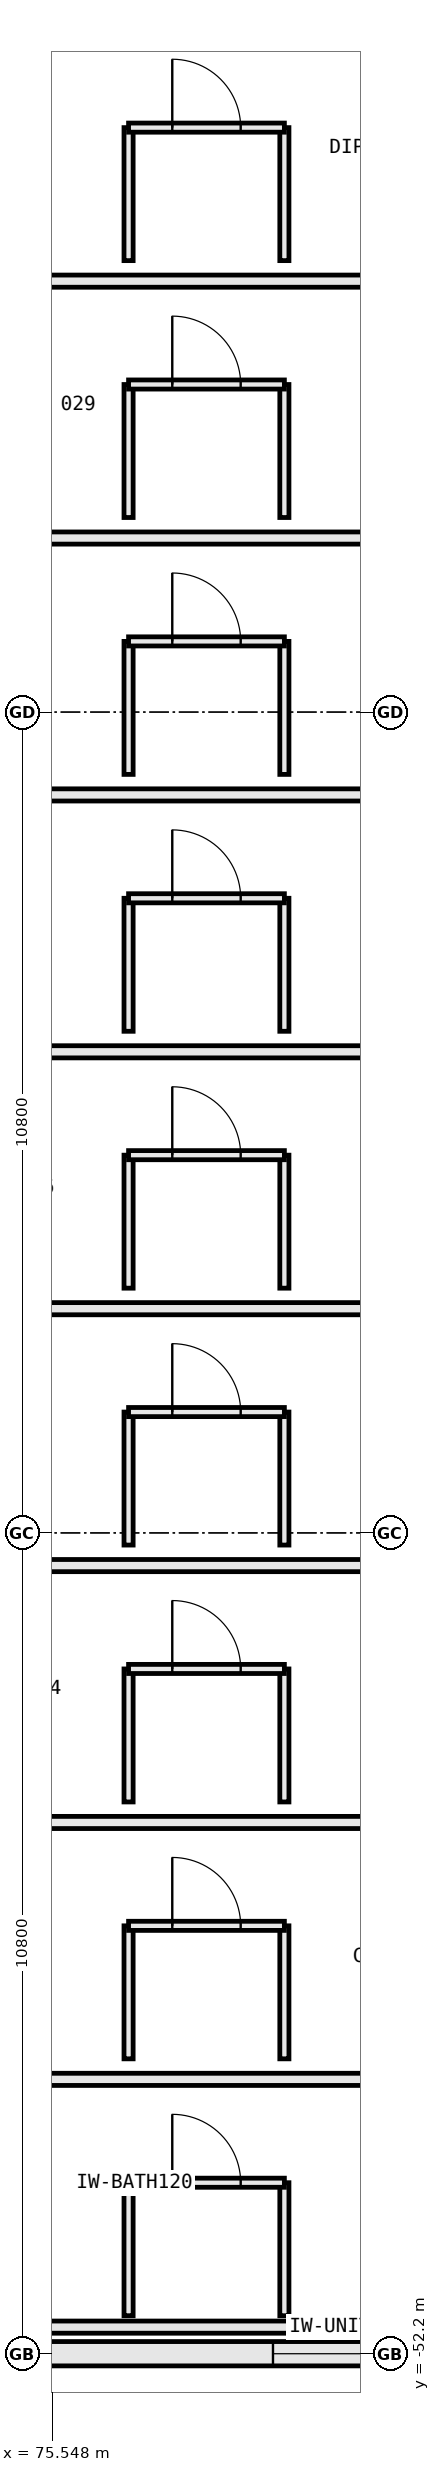
"""IFC4 building model, lengths in metres.
Left out: names, types, materials, properties, quantities, classifications, styles, units other than length and angle.
Written with IfcOpenShell. Run it as: python <this file> out.ifc"""

import sys

from ifc_helpers import new_model, si_unit, direction, frame, frame_2d, origin, place, context, subcontext, project, spatial, rectangle, extrude, element, fill, save


model = new_model("IFC4")
c1 = context("Model", 3, precision=1e-05, world=origin(), true_north=direction((0.0, 1.0)))
c2 = subcontext(c1, "Body", "Model", "MODEL_VIEW")
j1 = project(units=[si_unit("LENGTHUNIT", "METRE"), si_unit("PLANEANGLEUNIT", "RADIAN")], contexts=[c1])
p1 = place(None, origin())
s1 = spatial("IfcSite", under=j1, at=p1, CompositionType="ELEMENT")
p2 = place(p1, origin())
s2 = spatial("IfcBuilding", under=s1, at=p2, CompositionType="ELEMENT")
p3 = place(p2, frame((0.0, 0.0, 10.8)))
s3 = spatial("IfcBuildingStorey", under=s2, at=p3, CompositionType="ELEMENT", Elevation=10.8)
p4 = place(p3, frame((75.123, -52.2, 0.0), z_axis=(0.0, 0.0, 1.0), x_axis=(1.0, 0.0, 0.0)))
e1 = element("IfcWall", 1, at=p4, inside=s3, PredefinedType="STANDARD", context=c2, shape_type="SweptSolid", body=[
    extrude(rectangle(XDim=8.604, YDim=0.32, at=frame_2d((4.302, 0.0))), origin(), (0.0, 0.0, 1.0), 4.183),
])
p5 = place(p4, frame((3.327, 0.0, 0.85)))
e2 = element("IfcOpeningElement", 2, at=p5, cuts=e1, PredefinedType="OPENING", context=c2, shape_type="SweptSolid", body=[
    extrude(rectangle(XDim=1.95, YDim=1.9, at=frame_2d((0.975, 0.95))), frame((0.0, 0.172, 0.0), z_axis=(0.0, -1.0, 0.0), x_axis=(1.0, 0.0, 0.0)), (0.0, 0.0, 1.0), 0.344),
])
p6 = place(p3, frame((71.05, -51.85, 0.0), z_axis=(0.0, 0.0, 1.0), x_axis=(1.0, 0.0, 0.0)))
e3 = element("IfcWall", 3, at=p6, inside=s3, PredefinedType="PARTITIONING", context=c2, shape_type="SweptSolid", body=[
    extrude(rectangle(XDim=12.79, YDim=0.16, at=frame_2d((6.395, 0.0))), origin(), (0.0, 0.0, 1.0), 4.183),
])
p7 = place(p3, frame((71.05, -48.59, 0.0), z_axis=(0.0, 0.0, 1.0), x_axis=(1.0, 0.0, 0.0)))
e4 = element("IfcWall", 4, at=p7, inside=s3, PredefinedType="PARTITIONING", context=c2, shape_type="SweptSolid", body=[
    extrude(rectangle(XDim=12.79, YDim=0.16, at=frame_2d((6.395, 0.0))), origin(), (0.0, 0.0, 1.0), 4.8),
])
for number, where, z_axis, x_axis in (
    (5, (76.55, -51.7, 0.0), (0.0, 0.0, 1.0), (0.0, 1.0, 0.0)),
    (6, (78.6, -51.7, 0.0), (0.0, 0.0, 1.0), (0.0, 1.0, 0.0)),
):
    element("IfcWall", number, at=place(p3, frame(where, z_axis=z_axis, x_axis=x_axis)), inside=s3, PredefinedType="PARTITIONING", context=c2, shape_type="SweptSolid", body=[
        extrude(rectangle(XDim=1.75, YDim=0.12, at=frame_2d((0.875, 0.0))), origin(), (0.0, 0.0, 1.0), 4.8),
    ])
p8 = place(p3, frame((76.55, -49.95, 0.0), z_axis=(0.0, 0.0, 1.0), x_axis=(1.0, 0.0, 0.0)))
e7 = element("IfcWall", 7, at=p8, inside=s3, PredefinedType="PARTITIONING", context=c2, shape_type="SweptSolid", body=[
    extrude(rectangle(XDim=2.05, YDim=0.12, at=frame_2d((1.025, 0.0))), origin(), (0.0, 0.0, 1.0), 4.8),
])
p9 = place(p8, frame((0.575, 0.0, 0.0)))
e8 = element("IfcOpeningElement", 8, at=p9, cuts=e7, PredefinedType="OPENING", context=c2, shape_type="SweptSolid", body=[
    extrude(rectangle(XDim=0.9, YDim=2.15, at=frame_2d((0.45, 1.075))), frame((0.0, 0.072, 0.0), z_axis=(0.0, -1.0, 0.0), x_axis=(1.0, 0.0, 0.0)), (0.0, 0.0, 1.0), 0.144),
])
p10 = place(p3, frame((71.05, -45.21, 0.0), z_axis=(0.0, 0.0, 1.0), x_axis=(1.0, 0.0, 0.0)))
e9 = element("IfcWall", 9, at=p10, inside=s3, PredefinedType="PARTITIONING", context=c2, shape_type="SweptSolid", body=[
    extrude(rectangle(XDim=12.79, YDim=0.16, at=frame_2d((6.395, 0.0))), origin(), (0.0, 0.0, 1.0), 4.8),
])
for number, where, z_axis, x_axis in (
    (10, (76.55, -48.32, 0.0), (0.0, 0.0, 1.0), (0.0, 1.0, 0.0)),
    (11, (78.6, -48.32, 0.0), (0.0, 0.0, 1.0), (0.0, 1.0, 0.0)),
):
    element("IfcWall", number, at=place(p3, frame(where, z_axis=z_axis, x_axis=x_axis)), inside=s3, PredefinedType="PARTITIONING", context=c2, shape_type="SweptSolid", body=[
        extrude(rectangle(XDim=1.75, YDim=0.12, at=frame_2d((0.875, 0.0))), origin(), (0.0, 0.0, 1.0), 4.8),
    ])
p11 = place(p3, frame((76.55, -46.57, 0.0), z_axis=(0.0, 0.0, 1.0), x_axis=(1.0, 0.0, 0.0)))
e12 = element("IfcWall", 12, at=p11, inside=s3, PredefinedType="PARTITIONING", context=c2, shape_type="SweptSolid", body=[
    extrude(rectangle(XDim=2.05, YDim=0.12, at=frame_2d((1.025, 0.0))), origin(), (0.0, 0.0, 1.0), 4.8),
])
p12 = place(p11, frame((0.575, 0.0, 0.0)))
e13 = element("IfcOpeningElement", 13, at=p12, cuts=e12, PredefinedType="OPENING", context=c2, shape_type="SweptSolid", body=[
    extrude(rectangle(XDim=0.9, YDim=2.15, at=frame_2d((0.45, 1.075))), frame((0.0, 0.072, 0.0), z_axis=(0.0, -1.0, 0.0), x_axis=(1.0, 0.0, 0.0)), (0.0, 0.0, 1.0), 0.144),
])
p13 = place(p3, frame((71.05, -41.83, 0.0), z_axis=(0.0, 0.0, 1.0), x_axis=(1.0, 0.0, 0.0)))
e14 = element("IfcWall", 14, at=p13, inside=s3, PredefinedType="PARTITIONING", context=c2, shape_type="SweptSolid", body=[
    extrude(rectangle(XDim=12.79, YDim=0.16, at=frame_2d((6.395, 0.0))), origin(), (0.0, 0.0, 1.0), 4.8),
])
for number, where, z_axis, x_axis in (
    (15, (76.55, -44.94, 0.0), (0.0, 0.0, 1.0), (0.0, 1.0, 0.0)),
    (16, (78.6, -44.94, 0.0), (0.0, 0.0, 1.0), (0.0, 1.0, 0.0)),
):
    element("IfcWall", number, at=place(p3, frame(where, z_axis=z_axis, x_axis=x_axis)), inside=s3, PredefinedType="PARTITIONING", context=c2, shape_type="SweptSolid", body=[
        extrude(rectangle(XDim=1.75, YDim=0.12, at=frame_2d((0.875, 0.0))), origin(), (0.0, 0.0, 1.0), 4.8),
    ])
p14 = place(p3, frame((76.55, -43.19, 0.0), z_axis=(0.0, 0.0, 1.0), x_axis=(1.0, 0.0, 0.0)))
e17 = element("IfcWall", 17, at=p14, inside=s3, PredefinedType="PARTITIONING", context=c2, shape_type="SweptSolid", body=[
    extrude(rectangle(XDim=2.05, YDim=0.12, at=frame_2d((1.025, 0.0))), origin(), (0.0, 0.0, 1.0), 4.8),
])
p15 = place(p14, frame((0.575, 0.0, 0.0)))
e18 = element("IfcOpeningElement", 18, at=p15, cuts=e17, PredefinedType="OPENING", context=c2, shape_type="SweptSolid", body=[
    extrude(rectangle(XDim=0.9, YDim=2.15, at=frame_2d((0.45, 1.075))), frame((0.0, 0.072, 0.0), z_axis=(0.0, -1.0, 0.0), x_axis=(1.0, 0.0, 0.0)), (0.0, 0.0, 1.0), 0.144),
])
p16 = place(p3, frame((71.05, -38.45, 0.0), z_axis=(0.0, 0.0, 1.0), x_axis=(1.0, 0.0, 0.0)))
e19 = element("IfcWall", 19, at=p16, inside=s3, PredefinedType="PARTITIONING", context=c2, shape_type="SweptSolid", body=[
    extrude(rectangle(XDim=12.79, YDim=0.16, at=frame_2d((6.395, 0.0))), origin(), (0.0, 0.0, 1.0), 4.8),
])
for number, where, z_axis, x_axis in (
    (20, (76.55, -41.56, 0.0), (0.0, 0.0, 1.0), (0.0, 1.0, 0.0)),
    (21, (78.6, -41.56, 0.0), (0.0, 0.0, 1.0), (0.0, 1.0, 0.0)),
):
    element("IfcWall", number, at=place(p3, frame(where, z_axis=z_axis, x_axis=x_axis)), inside=s3, PredefinedType="PARTITIONING", context=c2, shape_type="SweptSolid", body=[
        extrude(rectangle(XDim=1.75, YDim=0.12, at=frame_2d((0.875, 0.0))), origin(), (0.0, 0.0, 1.0), 4.8),
    ])
p17 = place(p3, frame((76.55, -39.81, 0.0), z_axis=(0.0, 0.0, 1.0), x_axis=(1.0, 0.0, 0.0)))
e22 = element("IfcWall", 22, at=p17, inside=s3, PredefinedType="PARTITIONING", context=c2, shape_type="SweptSolid", body=[
    extrude(rectangle(XDim=2.05, YDim=0.12, at=frame_2d((1.025, 0.0))), origin(), (0.0, 0.0, 1.0), 4.8),
])
p18 = place(p17, frame((0.575, 0.0, 0.0)))
e23 = element("IfcOpeningElement", 23, at=p18, cuts=e22, PredefinedType="OPENING", context=c2, shape_type="SweptSolid", body=[
    extrude(rectangle(XDim=0.9, YDim=2.15, at=frame_2d((0.45, 1.075))), frame((0.0, 0.072, 0.0), z_axis=(0.0, -1.0, 0.0), x_axis=(1.0, 0.0, 0.0)), (0.0, 0.0, 1.0), 0.144),
])
p19 = place(p3, frame((71.05, -35.07, 0.0), z_axis=(0.0, 0.0, 1.0), x_axis=(1.0, 0.0, 0.0)))
e24 = element("IfcWall", 24, at=p19, inside=s3, PredefinedType="PARTITIONING", context=c2, shape_type="SweptSolid", body=[
    extrude(rectangle(XDim=12.79, YDim=0.16, at=frame_2d((6.395, 0.0))), origin(), (0.0, 0.0, 1.0), 4.8),
])
for number, where, z_axis, x_axis in (
    (25, (76.55, -38.18, 0.0), (0.0, 0.0, 1.0), (0.0, 1.0, 0.0)),
    (26, (78.6, -38.18, 0.0), (0.0, 0.0, 1.0), (0.0, 1.0, 0.0)),
):
    element("IfcWall", number, at=place(p3, frame(where, z_axis=z_axis, x_axis=x_axis)), inside=s3, PredefinedType="PARTITIONING", context=c2, shape_type="SweptSolid", body=[
        extrude(rectangle(XDim=1.75, YDim=0.12, at=frame_2d((0.875, 0.0))), origin(), (0.0, 0.0, 1.0), 4.8),
    ])
p20 = place(p3, frame((76.55, -36.43, 0.0), z_axis=(0.0, 0.0, 1.0), x_axis=(1.0, 0.0, 0.0)))
e27 = element("IfcWall", 27, at=p20, inside=s3, PredefinedType="PARTITIONING", context=c2, shape_type="SweptSolid", body=[
    extrude(rectangle(XDim=2.05, YDim=0.12, at=frame_2d((1.025, 0.0))), origin(), (0.0, 0.0, 1.0), 4.8),
])
p21 = place(p20, frame((0.575, 0.0, 0.0)))
e28 = element("IfcOpeningElement", 28, at=p21, cuts=e27, PredefinedType="OPENING", context=c2, shape_type="SweptSolid", body=[
    extrude(rectangle(XDim=0.9, YDim=2.15, at=frame_2d((0.45, 1.075))), frame((0.0, 0.072, 0.0), z_axis=(0.0, -1.0, 0.0), x_axis=(1.0, 0.0, 0.0)), (0.0, 0.0, 1.0), 0.144),
])
p22 = place(p3, frame((71.05, -31.69, 0.0), z_axis=(0.0, 0.0, 1.0), x_axis=(1.0, 0.0, 0.0)))
e29 = element("IfcWall", 29, at=p22, inside=s3, PredefinedType="PARTITIONING", context=c2, shape_type="SweptSolid", body=[
    extrude(rectangle(XDim=12.79, YDim=0.16, at=frame_2d((6.395, 0.0))), origin(), (0.0, 0.0, 1.0), 4.8),
])
for number, where, z_axis, x_axis in (
    (30, (76.55, -34.8, 0.0), (0.0, 0.0, 1.0), (0.0, 1.0, 0.0)),
    (31, (78.6, -34.8, 0.0), (0.0, 0.0, 1.0), (0.0, 1.0, 0.0)),
):
    element("IfcWall", number, at=place(p3, frame(where, z_axis=z_axis, x_axis=x_axis)), inside=s3, PredefinedType="PARTITIONING", context=c2, shape_type="SweptSolid", body=[
        extrude(rectangle(XDim=1.75, YDim=0.12, at=frame_2d((0.875, 0.0))), origin(), (0.0, 0.0, 1.0), 4.8),
    ])
p23 = place(p3, frame((76.55, -33.05, 0.0), z_axis=(0.0, 0.0, 1.0), x_axis=(1.0, 0.0, 0.0)))
e32 = element("IfcWall", 32, at=p23, inside=s3, PredefinedType="PARTITIONING", context=c2, shape_type="SweptSolid", body=[
    extrude(rectangle(XDim=2.05, YDim=0.12, at=frame_2d((1.025, 0.0))), origin(), (0.0, 0.0, 1.0), 4.8),
])
p24 = place(p23, frame((0.575, 0.0, 0.0)))
e33 = element("IfcOpeningElement", 33, at=p24, cuts=e32, PredefinedType="OPENING", context=c2, shape_type="SweptSolid", body=[
    extrude(rectangle(XDim=0.9, YDim=2.15, at=frame_2d((0.45, 1.075))), frame((0.0, 0.072, 0.0), z_axis=(0.0, -1.0, 0.0), x_axis=(1.0, 0.0, 0.0)), (0.0, 0.0, 1.0), 0.144),
])
p25 = place(p3, frame((71.05, -28.31, 0.0), z_axis=(0.0, 0.0, 1.0), x_axis=(1.0, 0.0, 0.0)))
e34 = element("IfcWall", 34, at=p25, inside=s3, PredefinedType="PARTITIONING", context=c2, shape_type="SweptSolid", body=[
    extrude(rectangle(XDim=12.79, YDim=0.16, at=frame_2d((6.395, 0.0))), origin(), (0.0, 0.0, 1.0), 3.775),
])
for number, where, z_axis, x_axis in (
    (35, (76.55, -31.42, 0.0), (0.0, 0.0, 1.0), (0.0, 1.0, 0.0)),
    (36, (78.6, -31.42, 0.0), (0.0, 0.0, 1.0), (0.0, 1.0, 0.0)),
):
    element("IfcWall", number, at=place(p3, frame(where, z_axis=z_axis, x_axis=x_axis)), inside=s3, PredefinedType="PARTITIONING", context=c2, shape_type="SweptSolid", body=[
        extrude(rectangle(XDim=1.75, YDim=0.12, at=frame_2d((0.875, 0.0))), origin(), (0.0, 0.0, 1.0), 4.8),
    ])
p26 = place(p3, frame((76.55, -29.67, 0.0), z_axis=(0.0, 0.0, 1.0), x_axis=(1.0, 0.0, 0.0)))
e37 = element("IfcWall", 37, at=p26, inside=s3, PredefinedType="PARTITIONING", context=c2, shape_type="SweptSolid", body=[
    extrude(rectangle(XDim=2.05, YDim=0.12, at=frame_2d((1.025, 0.0))), origin(), (0.0, 0.0, 1.0), 4.8),
])
p27 = place(p26, frame((0.575, 0.0, 0.0)))
e38 = element("IfcOpeningElement", 38, at=p27, cuts=e37, PredefinedType="OPENING", context=c2, shape_type="SweptSolid", body=[
    extrude(rectangle(XDim=0.9, YDim=2.15, at=frame_2d((0.45, 1.075))), frame((0.0, 0.072, 0.0), z_axis=(0.0, -1.0, 0.0), x_axis=(1.0, 0.0, 0.0)), (0.0, 0.0, 1.0), 0.144),
])
p28 = place(p3, frame((71.05, -24.93, 0.0), z_axis=(0.0, 0.0, 1.0), x_axis=(1.0, 0.0, 0.0)))
e39 = element("IfcWall", 39, at=p28, inside=s3, PredefinedType="PARTITIONING", context=c2, shape_type="SweptSolid", body=[
    extrude(rectangle(XDim=12.79, YDim=0.16, at=frame_2d((6.395, 0.0))), origin(), (0.0, 0.0, 1.0), 4.8),
])
for number, where, z_axis, x_axis in (
    (40, (76.55, -28.04, 0.0), (0.0, 0.0, 1.0), (0.0, 1.0, 0.0)),
    (41, (78.6, -28.04, 0.0), (0.0, 0.0, 1.0), (0.0, 1.0, 0.0)),
):
    element("IfcWall", number, at=place(p3, frame(where, z_axis=z_axis, x_axis=x_axis)), inside=s3, PredefinedType="PARTITIONING", context=c2, shape_type="SweptSolid", body=[
        extrude(rectangle(XDim=1.75, YDim=0.12, at=frame_2d((0.875, 0.0))), origin(), (0.0, 0.0, 1.0), 4.8),
    ])
p29 = place(p3, frame((76.55, -26.29, 0.0), z_axis=(0.0, 0.0, 1.0), x_axis=(1.0, 0.0, 0.0)))
e42 = element("IfcWall", 42, at=p29, inside=s3, PredefinedType="PARTITIONING", context=c2, shape_type="SweptSolid", body=[
    extrude(rectangle(XDim=2.05, YDim=0.12, at=frame_2d((1.025, 0.0))), origin(), (0.0, 0.0, 1.0), 4.8),
])
p30 = place(p29, frame((0.575, 0.0, 0.0)))
e43 = element("IfcOpeningElement", 43, at=p30, cuts=e42, PredefinedType="OPENING", context=c2, shape_type="SweptSolid", body=[
    extrude(rectangle(XDim=0.9, YDim=2.15, at=frame_2d((0.45, 1.075))), frame((0.0, 0.072, 0.0), z_axis=(0.0, -1.0, 0.0), x_axis=(1.0, 0.0, 0.0)), (0.0, 0.0, 1.0), 0.144),
])
for number, where, z_axis, x_axis in (
    (44, (76.55, -24.66, 0.0), (0.0, 0.0, 1.0), (0.0, 1.0, 0.0)),
    (45, (78.6, -24.66, 0.0), (0.0, 0.0, 1.0), (0.0, 1.0, 0.0)),
):
    element("IfcWall", number, at=place(p3, frame(where, z_axis=z_axis, x_axis=x_axis)), inside=s3, PredefinedType="PARTITIONING", context=c2, shape_type="SweptSolid", body=[
        extrude(rectangle(XDim=1.75, YDim=0.12, at=frame_2d((0.875, 0.0))), origin(), (0.0, 0.0, 1.0), 4.8),
    ])
p31 = place(p3, frame((76.55, -22.91, 0.0), z_axis=(0.0, 0.0, 1.0), x_axis=(1.0, 0.0, 0.0)))
e46 = element("IfcWall", 46, at=p31, inside=s3, PredefinedType="PARTITIONING", context=c2, shape_type="SweptSolid", body=[
    extrude(rectangle(XDim=2.05, YDim=0.12, at=frame_2d((1.025, 0.0))), origin(), (0.0, 0.0, 1.0), 4.8),
])
p32 = place(p31, frame((0.575, 0.0, 0.0)))
e47 = element("IfcOpeningElement", 47, at=p32, cuts=e46, PredefinedType="OPENING", context=c2, shape_type="SweptSolid", body=[
    extrude(rectangle(XDim=0.9, YDim=2.15, at=frame_2d((0.45, 1.075))), frame((0.0, 0.072, 0.0), z_axis=(0.0, -1.0, 0.0), x_axis=(1.0, 0.0, 0.0)), (0.0, 0.0, 1.0), 0.144),
])
p33 = place(p5, origin())
e48 = element("IfcWindow", 48, at=p33, inside=s3, PartitioningType="DOUBLE_PANEL_VERTICAL", PredefinedType="WINDOW", context=c2, shape_type="SweptSolid", body=[
    extrude(rectangle(XDim=1.95, YDim=1.9, at=frame_2d((0.975, 0.95))), frame((0.0, 0.03, 0.0), z_axis=(0.0, -1.0, 0.0), x_axis=(1.0, 0.0, 0.0)), (0.0, 0.0, 1.0), 0.06),
])
fill(e2, e48)
p34 = place(p9, origin())
e49 = element("IfcDoor", 49, at=p34, inside=s3, OperationType="SINGLE_SWING_LEFT", PredefinedType="DOOR", context=c2, shape_type="SweptSolid", body=[
    extrude(rectangle(XDim=0.9, YDim=2.15, at=frame_2d((0.45, 1.075))), frame((0.0, 0.025, 0.0), z_axis=(0.0, -1.0, 0.0), x_axis=(1.0, 0.0, 0.0)), (0.0, 0.0, 1.0), 0.05),
])
fill(e8, e49)
p35 = place(p12, origin())
e50 = element("IfcDoor", 50, at=p35, inside=s3, OperationType="SINGLE_SWING_LEFT", PredefinedType="DOOR", context=c2, shape_type="SweptSolid", body=[
    extrude(rectangle(XDim=0.9, YDim=2.15, at=frame_2d((0.45, 1.075))), frame((0.0, 0.025, 0.0), z_axis=(0.0, -1.0, 0.0), x_axis=(1.0, 0.0, 0.0)), (0.0, 0.0, 1.0), 0.05),
])
fill(e13, e50)
p36 = place(p15, origin())
e51 = element("IfcDoor", 51, at=p36, inside=s3, OperationType="SINGLE_SWING_LEFT", PredefinedType="DOOR", context=c2, shape_type="SweptSolid", body=[
    extrude(rectangle(XDim=0.9, YDim=2.15, at=frame_2d((0.45, 1.075))), frame((0.0, 0.025, 0.0), z_axis=(0.0, -1.0, 0.0), x_axis=(1.0, 0.0, 0.0)), (0.0, 0.0, 1.0), 0.05),
])
fill(e18, e51)
p37 = place(p18, origin())
e52 = element("IfcDoor", 52, at=p37, inside=s3, OperationType="SINGLE_SWING_LEFT", PredefinedType="DOOR", context=c2, shape_type="SweptSolid", body=[
    extrude(rectangle(XDim=0.9, YDim=2.15, at=frame_2d((0.45, 1.075))), frame((0.0, 0.025, 0.0), z_axis=(0.0, -1.0, 0.0), x_axis=(1.0, 0.0, 0.0)), (0.0, 0.0, 1.0), 0.05),
])
fill(e23, e52)
p38 = place(p21, origin())
e53 = element("IfcDoor", 53, at=p38, inside=s3, OperationType="SINGLE_SWING_LEFT", PredefinedType="DOOR", context=c2, shape_type="SweptSolid", body=[
    extrude(rectangle(XDim=0.9, YDim=2.15, at=frame_2d((0.45, 1.075))), frame((0.0, 0.025, 0.0), z_axis=(0.0, -1.0, 0.0), x_axis=(1.0, 0.0, 0.0)), (0.0, 0.0, 1.0), 0.05),
])
fill(e28, e53)
p39 = place(p24, origin())
e54 = element("IfcDoor", 54, at=p39, inside=s3, OperationType="SINGLE_SWING_LEFT", PredefinedType="DOOR", context=c2, shape_type="SweptSolid", body=[
    extrude(rectangle(XDim=0.9, YDim=2.15, at=frame_2d((0.45, 1.075))), frame((0.0, 0.025, 0.0), z_axis=(0.0, -1.0, 0.0), x_axis=(1.0, 0.0, 0.0)), (0.0, 0.0, 1.0), 0.05),
])
fill(e33, e54)
p40 = place(p27, origin())
e55 = element("IfcDoor", 55, at=p40, inside=s3, OperationType="SINGLE_SWING_LEFT", PredefinedType="DOOR", context=c2, shape_type="SweptSolid", body=[
    extrude(rectangle(XDim=0.9, YDim=2.15, at=frame_2d((0.45, 1.075))), frame((0.0, 0.025, 0.0), z_axis=(0.0, -1.0, 0.0), x_axis=(1.0, 0.0, 0.0)), (0.0, 0.0, 1.0), 0.05),
])
fill(e38, e55)
p41 = place(p30, origin())
e56 = element("IfcDoor", 56, at=p41, inside=s3, OperationType="SINGLE_SWING_LEFT", PredefinedType="DOOR", context=c2, shape_type="SweptSolid", body=[
    extrude(rectangle(XDim=0.9, YDim=2.15, at=frame_2d((0.45, 1.075))), frame((0.0, 0.025, 0.0), z_axis=(0.0, -1.0, 0.0), x_axis=(1.0, 0.0, 0.0)), (0.0, 0.0, 1.0), 0.05),
])
fill(e43, e56)
p42 = place(p32, origin())
e57 = element("IfcDoor", 57, at=p42, inside=s3, OperationType="SINGLE_SWING_LEFT", PredefinedType="DOOR", context=c2, shape_type="SweptSolid", body=[
    extrude(rectangle(XDim=0.9, YDim=2.15, at=frame_2d((0.45, 1.075))), frame((0.0, 0.025, 0.0), z_axis=(0.0, -1.0, 0.0), x_axis=(1.0, 0.0, 0.0)), (0.0, 0.0, 1.0), 0.05),
])
fill(e47, e57)
save(model, sys.argv[1])
